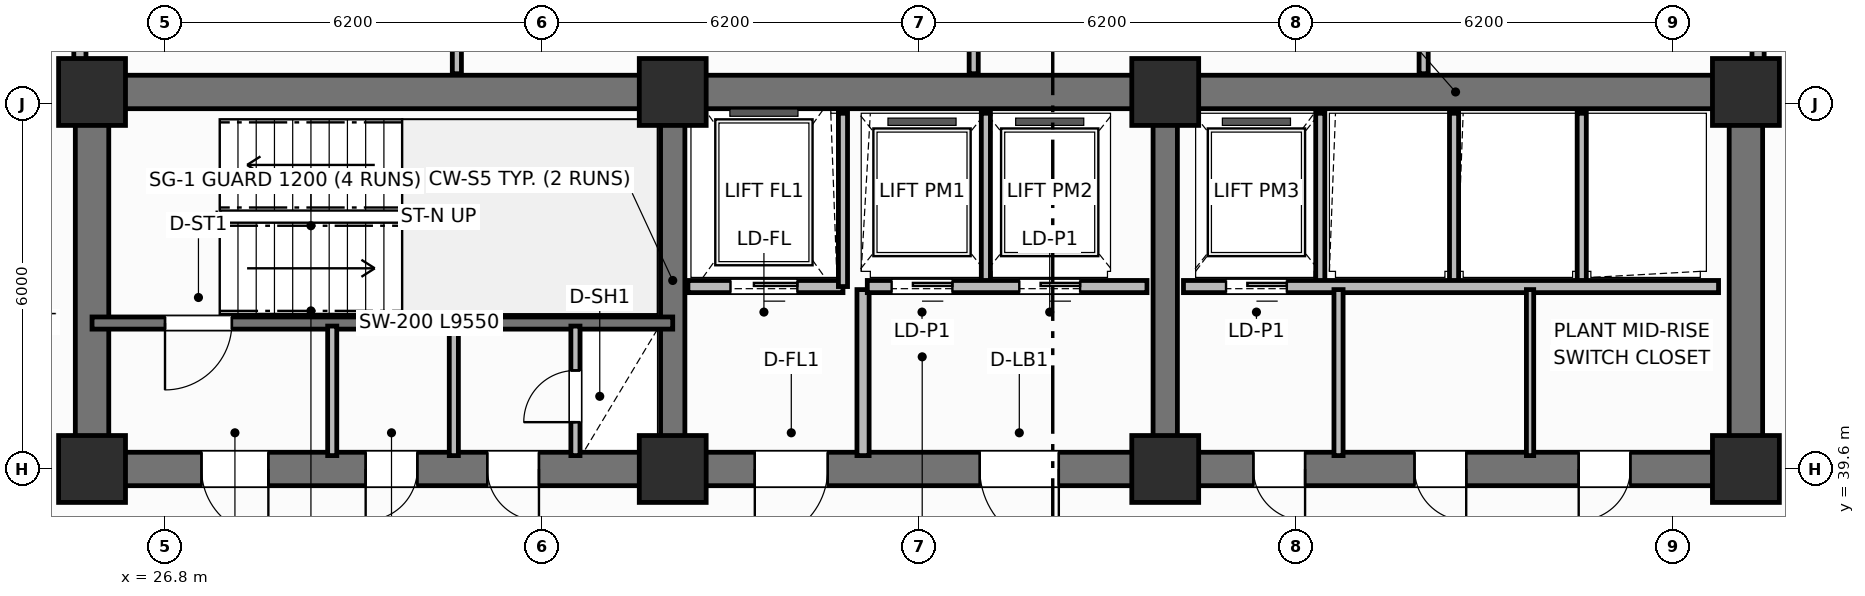
"""IFC4 building model, lengths in metres.
Left out: names, types, materials, properties, quantities, classifications, styles, units other than length and angle.
Written with IfcOpenShell. Run it as: python <this file> out.ifc"""

import sys

from ifc_helpers import new_model, si_unit, direction, frame, frame_2d, origin, origin_2d, place, context, subcontext, project, spatial, rectangle, extrude, element, fill, save


model = new_model("IFC4")
c1 = context("Model", 3, precision=1e-05, world=origin(), true_north=direction((0.0, 1.0)))
c2 = subcontext(c1, "Body", "Model", "MODEL_VIEW")
j1 = project(units=[si_unit("LENGTHUNIT", "METRE"), si_unit("PLANEANGLEUNIT", "RADIAN")], contexts=[c1])
p1 = place(None, origin())
s1 = spatial("IfcSite", under=j1, at=p1, CompositionType="ELEMENT")
p2 = place(p1, origin())
s2 = spatial("IfcBuilding", under=s1, at=p2, CompositionType="ELEMENT")
p3 = place(p2, frame((0.0, 0.0, 129.0)))
s3 = spatial("IfcBuildingStorey", under=s2, at=p3, CompositionType="ELEMENT", Elevation=129.0)
p4 = place(p3, frame((25.6, 45.8, 0.0), z_axis=(0.0, 0.0, 1.0), x_axis=(1.0, 0.0, 0.0)))
e1 = element("IfcWall", 1, at=p4, inside=s3, PredefinedType="SHEAR", context=c2, shape_type="SweptSolid", body=[
    extrude(rectangle(XDim=27.2, YDim=0.55, at=frame_2d((13.6, 0.0))), origin(), (0.0, 0.0, 1.0), 3.7),
])
for number, where, z_axis, x_axis in (
    (2, (25.6, 39.875, 0.0), (0.0, 0.0, 1.0), (0.0, 1.0, 0.0)),
    (3, (52.8, 39.875, 0.0), (0.0, 0.0, 1.0), (0.0, 1.0, 0.0)),
):
    element("IfcWall", number, at=place(p3, frame(where, z_axis=z_axis, x_axis=x_axis)), inside=s3, PredefinedType="SHEAR", context=c2, shape_type="SweptSolid", body=[
        extrude(rectangle(XDim=5.65, YDim=0.55, at=frame_2d((2.825, 0.0))), origin(), (0.0, 0.0, 1.0), 3.7),
    ])
p5 = place(p3, frame((52.8, 39.6, 0.0), z_axis=(0.0, 0.0, 1.0), x_axis=(-1.0, 0.0, 0.0)))
e4 = element("IfcWall", 4, at=p5, inside=s3, PredefinedType="SHEAR", context=c2, shape_type="SweptSolid", body=[
    extrude(rectangle(XDim=27.2, YDim=0.55, at=frame_2d((13.6, 0.0))), origin(), (0.0, 0.0, 1.0), 3.7),
])
p6 = place(p5, frame((24.3, 0.0, 0.0)))
e5 = element("IfcOpeningElement", 5, at=p6, cuts=e4, PredefinedType="OPENING", context=c2, shape_type="SweptSolid", body=[
    extrude(rectangle(XDim=1.1, YDim=2.15, at=frame_2d((0.55, 1.075))), frame((0.0, 0.285, 0.0), z_axis=(0.0, -1.0, 0.0), x_axis=(1.0, 0.0, 0.0)), (0.0, 0.0, 1.0), 0.57),
])
p7 = place(p5, frame((21.85, 0.0, 0.0)))
e6 = element("IfcOpeningElement", 6, at=p7, cuts=e4, PredefinedType="OPENING", context=c2, shape_type="SweptSolid", body=[
    extrude(rectangle(XDim=0.85, YDim=2.1, at=frame_2d((0.425, 1.05))), frame((0.0, 0.285, 0.0), z_axis=(0.0, -1.0, 0.0), x_axis=(1.0, 0.0, 0.0)), (0.0, 0.0, 1.0), 0.57),
])
p8 = place(p5, frame((19.85, 0.0, 0.0)))
e7 = element("IfcOpeningElement", 7, at=p8, cuts=e4, PredefinedType="OPENING", context=c2, shape_type="SweptSolid", body=[
    extrude(rectangle(XDim=0.85, YDim=2.1, at=frame_2d((0.425, 1.05))), frame((0.0, 0.285, 0.0), z_axis=(0.0, -1.0, 0.0), x_axis=(1.0, 0.0, 0.0)), (0.0, 0.0, 1.0), 0.57),
])
p9 = place(p5, frame((15.1, 0.0, 0.0)))
e8 = element("IfcOpeningElement", 8, at=p9, cuts=e4, PredefinedType="OPENING", context=c2, shape_type="SweptSolid", body=[
    extrude(rectangle(XDim=1.2, YDim=2.15, at=frame_2d((0.6, 1.075))), frame((0.0, 0.285, 0.0), z_axis=(0.0, -1.0, 0.0), x_axis=(1.0, 0.0, 0.0)), (0.0, 0.0, 1.0), 0.57),
])
p10 = place(p5, frame((11.3, 0.0, 0.0)))
e9 = element("IfcOpeningElement", 9, at=p10, cuts=e4, PredefinedType="OPENING", context=c2, shape_type="SweptSolid", body=[
    extrude(rectangle(XDim=1.3, YDim=2.2, at=frame_2d((0.65, 1.1))), frame((0.0, 0.285, 0.0), z_axis=(0.0, -1.0, 0.0), x_axis=(1.0, 0.0, 0.0)), (0.0, 0.0, 1.0), 0.57),
])
p11 = place(p5, frame((7.25, 0.0, 0.0)))
e10 = element("IfcOpeningElement", 10, at=p11, cuts=e4, PredefinedType="OPENING", context=c2, shape_type="SweptSolid", body=[
    extrude(rectangle(XDim=0.85, YDim=2.1, at=frame_2d((0.425, 1.05))), frame((0.0, 0.285, 0.0), z_axis=(0.0, -1.0, 0.0), x_axis=(1.0, 0.0, 0.0)), (0.0, 0.0, 1.0), 0.57),
])
p12 = place(p5, frame((4.6, 0.0, 0.0)))
e11 = element("IfcOpeningElement", 11, at=p12, cuts=e4, PredefinedType="OPENING", context=c2, shape_type="SweptSolid", body=[
    extrude(rectangle(XDim=0.85, YDim=2.1, at=frame_2d((0.425, 1.05))), frame((0.0, 0.285, 0.0), z_axis=(0.0, -1.0, 0.0), x_axis=(1.0, 0.0, 0.0)), (0.0, 0.0, 1.0), 0.57),
])
p13 = place(p5, frame((1.9, 0.0, 0.0)))
e12 = element("IfcOpeningElement", 12, at=p13, cuts=e4, PredefinedType="OPENING", context=c2, shape_type="SweptSolid", body=[
    extrude(rectangle(XDim=0.85, YDim=2.1, at=frame_2d((0.425, 1.05))), frame((0.0, 0.285, 0.0), z_axis=(0.0, -1.0, 0.0), x_axis=(1.0, 0.0, 0.0)), (0.0, 0.0, 1.0), 0.57),
])
for number, where, z_axis, x_axis in (
    (13, (35.15, 39.875, 0.0), (0.0, 0.0, 1.0), (0.0, 1.0, 0.0)),
    (14, (43.25, 39.875, 0.0), (0.0, 0.0, 1.0), (0.0, 1.0, 0.0)),
):
    element("IfcWall", number, at=place(p3, frame(where, z_axis=z_axis, x_axis=x_axis)), inside=s3, PredefinedType="SHEAR", context=c2, shape_type="SweptSolid", body=[
        extrude(rectangle(XDim=5.65, YDim=0.4, at=frame_2d((2.825, 0.0))), origin(), (0.0, 0.0, 1.0), 3.7),
    ])
for number, where, z_axis, x_axis in (
    (15, (25.6, 39.6, 0.0), (0.0, 0.0, 1.0), (1.0, 0.0, 0.0)),
    (16, (25.6, 45.8, 0.0), (0.0, 0.0, 1.0), (1.0, 0.0, 0.0)),
    (17, (35.15, 39.6, 0.0), (0.0, 0.0, 1.0), (1.0, 0.0, 0.0)),
    (18, (35.15, 45.8, 0.0), (0.0, 0.0, 1.0), (1.0, 0.0, 0.0)),
    (19, (43.25, 39.6, 0.0), (0.0, 0.0, 1.0), (1.0, 0.0, 0.0)),
    (20, (43.25, 45.8, 0.0), (0.0, 0.0, 1.0), (1.0, 0.0, 0.0)),
    (21, (52.8, 39.6, 0.0), (0.0, 0.0, 1.0), (1.0, 0.0, 0.0)),
    (22, (52.8, 45.8, 0.0), (0.0, 0.0, 1.0), (1.0, 0.0, 0.0)),
):
    element("IfcColumn", number, at=place(p3, frame(where, z_axis=z_axis, x_axis=x_axis)), inside=s3, PredefinedType="COLUMN", context=c2, shape_type="SweptSolid", body=[
        extrude(rectangle(XDim=1.1, YDim=1.1, at=origin_2d()), origin(), (0.0, 0.0, 1.0), 3.7),
    ])
p14 = place(p3, frame((35.15, 42.0, 0.0), z_axis=(0.0, 0.0, 1.0), x_axis=(-1.0, 0.0, 0.0)))
e23 = element("IfcWall", 23, at=p14, inside=s3, PredefinedType="SHEAR", context=c2, shape_type="SweptSolid", body=[
    extrude(rectangle(XDim=9.55, YDim=0.2, at=frame_2d((4.775, 0.0))), origin(), (0.0, 0.0, 1.0), 3.7),
])
p15 = place(p14, frame((7.25, 0.0, 0.0)))
e24 = element("IfcOpeningElement", 24, at=p15, cuts=e23, PredefinedType="OPENING", context=c2, shape_type="SweptSolid", body=[
    extrude(rectangle(XDim=1.1, YDim=2.15, at=frame_2d((0.55, 1.075))), frame((0.0, 0.11, 0.0), z_axis=(0.0, -1.0, 0.0), x_axis=(1.0, 0.0, 0.0)), (0.0, 0.0, 1.0), 0.22),
])
p16 = place(p3, frame((33.55, 39.82, 0.0), z_axis=(0.0, 0.0, 1.0), x_axis=(0.0, 1.0, 0.0)))
e25 = element("IfcWall", 25, at=p16, inside=s3, PredefinedType="PARTITIONING", context=c2, shape_type="SweptSolid", body=[
    extrude(rectangle(XDim=2.13, YDim=0.15, at=frame_2d((1.065, 0.0))), origin(), (0.0, 0.0, 1.0), 2.53),
])
p17 = place(p16, frame((0.55, 0.0, 0.0)))
e26 = element("IfcOpeningElement", 26, at=p17, cuts=e25, PredefinedType="OPENING", context=c2, shape_type="SweptSolid", body=[
    extrude(rectangle(XDim=0.85, YDim=2.05, at=frame_2d((0.425, 1.025))), frame((0.0, 0.085, 0.0), z_axis=(0.0, -1.0, 0.0), x_axis=(1.0, 0.0, 0.0)), (0.0, 0.0, 1.0), 0.17),
])
for number, where, z_axis, x_axis in (
    (27, (29.55, 39.82, 0.0), (0.0, 0.0, 1.0), (0.0, 1.0, 0.0)),
    (28, (31.55, 39.82, 0.0), (0.0, 0.0, 1.0), (0.0, 1.0, 0.0)),
):
    element("IfcWall", number, at=place(p3, frame(where, z_axis=z_axis, x_axis=x_axis)), inside=s3, PredefinedType="PARTITIONING", context=c2, shape_type="SweptSolid", body=[
        extrude(rectangle(XDim=2.13, YDim=0.15, at=frame_2d((1.065, 0.0))), origin(), (0.0, 0.0, 1.0), 2.53),
    ])
p18 = place(p3, frame((37.95, 42.6, 0.0), z_axis=(0.0, 0.0, 1.0), x_axis=(-1.0, 0.0, 0.0)))
e29 = element("IfcWall", 29, at=p18, inside=s3, PredefinedType="PARTITIONING", context=c2, shape_type="SweptSolid", body=[
    extrude(rectangle(XDim=2.55, YDim=0.2, at=frame_2d((1.275, 0.0))), origin(), (0.0, 0.0, 1.0), 2.3),
])
p19 = place(p18, frame((0.75, 0.0, 0.0)))
e30 = element("IfcOpeningElement", 30, at=p19, cuts=e29, PredefinedType="OPENING", context=c2, shape_type="SweptSolid", body=[
    extrude(rectangle(XDim=1.1, YDim=2.15, at=frame_2d((0.55, 1.075))), frame((0.0, 0.11, 0.0), z_axis=(0.0, -1.0, 0.0), x_axis=(1.0, 0.0, 0.0)), (0.0, 0.0, 1.0), 0.22),
])
p20 = place(p3, frame((37.95, 42.6, 0.0), z_axis=(0.0, 0.0, 1.0), x_axis=(0.0, 1.0, 0.0)))
e31 = element("IfcWall", 31, at=p20, inside=s3, PredefinedType="PARTITIONING", context=c2, shape_type="SweptSolid", body=[
    extrude(rectangle(XDim=2.85, YDim=0.15, at=frame_2d((1.425, 0.0))), origin(), (0.0, 0.0, 1.0), 2.53),
])
p21 = place(p3, frame((38.28, 39.82, 0.0), z_axis=(0.0, 0.0, 1.0), x_axis=(0.0, 1.0, 0.0)))
e32 = element("IfcWall", 32, at=p21, inside=s3, PredefinedType="PARTITIONING", context=c2, shape_type="SweptSolid", body=[
    extrude(rectangle(XDim=2.73, YDim=0.2, at=frame_2d((1.365, 0.0))), origin(), (0.0, 0.0, 1.0), 2.53),
])
p22 = place(p3, frame((40.3, 42.65, 0.0), z_axis=(0.0, 0.0, 1.0), x_axis=(0.0, 1.0, 0.0)))
e33 = element("IfcWall", 33, at=p22, inside=s3, PredefinedType="PARTITIONING", context=c2, shape_type="SweptSolid", body=[
    extrude(rectangle(XDim=2.8, YDim=0.15, at=frame_2d((1.4, 0.0))), origin(), (0.0, 0.0, 1.0), 2.53),
])
p23 = place(p3, frame((42.95, 42.6, 0.0), z_axis=(0.0, 0.0, 1.0), x_axis=(-1.0, 0.0, 0.0)))
e34 = element("IfcWall", 34, at=p23, inside=s3, PredefinedType="PARTITIONING", context=c2, shape_type="SweptSolid", body=[
    extrude(rectangle(XDim=4.6, YDim=0.2, at=frame_2d((2.3, 0.0))), origin(), (0.0, 0.0, 1.0), 2.3),
])
p24 = place(p23, frame((3.2, 0.0, 0.0)))
e35 = element("IfcOpeningElement", 35, at=p24, cuts=e34, PredefinedType="OPENING", context=c2, shape_type="SweptSolid", body=[
    extrude(rectangle(XDim=1.0, YDim=2.15, at=frame_2d((0.5, 1.075))), frame((0.0, 0.11, 0.0), z_axis=(0.0, -1.0, 0.0), x_axis=(1.0, 0.0, 0.0)), (0.0, 0.0, 1.0), 0.22),
])
p25 = place(p23, frame((1.1, 0.0, 0.0)))
e36 = element("IfcOpeningElement", 36, at=p25, cuts=e34, PredefinedType="OPENING", context=c2, shape_type="SweptSolid", body=[
    extrude(rectangle(XDim=1.0, YDim=2.15, at=frame_2d((0.5, 1.075))), frame((0.0, 0.11, 0.0), z_axis=(0.0, -1.0, 0.0), x_axis=(1.0, 0.0, 0.0)), (0.0, 0.0, 1.0), 0.22),
])
for number, where, z_axis, x_axis in (
    (37, (45.8, 42.65, 0.0), (0.0, 0.0, 1.0), (0.0, 1.0, 0.0)),
    (38, (48.0, 42.65, 0.0), (0.0, 0.0, 1.0), (0.0, 1.0, 0.0)),
    (39, (50.1, 42.65, 0.0), (0.0, 0.0, 1.0), (0.0, 1.0, 0.0)),
):
    element("IfcWall", number, at=place(p3, frame(where, z_axis=z_axis, x_axis=x_axis)), inside=s3, PredefinedType="PARTITIONING", context=c2, shape_type="SweptSolid", body=[
        extrude(rectangle(XDim=2.8, YDim=0.15, at=frame_2d((1.4, 0.0))), origin(), (0.0, 0.0, 1.0), 2.53),
    ])
p26 = place(p3, frame((52.35, 42.6, 0.0), z_axis=(0.0, 0.0, 1.0), x_axis=(-1.0, 0.0, 0.0)))
e40 = element("IfcWall", 40, at=p26, inside=s3, PredefinedType="PARTITIONING", context=c2, shape_type="SweptSolid", body=[
    extrude(rectangle(XDim=8.8, YDim=0.2, at=frame_2d((4.4, 0.0))), origin(), (0.0, 0.0, 1.0), 2.53),
])
p27 = place(p26, frame((7.1, 0.0, 0.0)))
e41 = element("IfcOpeningElement", 41, at=p27, cuts=e40, PredefinedType="OPENING", context=c2, shape_type="SweptSolid", body=[
    extrude(rectangle(XDim=1.0, YDim=2.15, at=frame_2d((0.5, 1.075))), frame((0.0, 0.11, 0.0), z_axis=(0.0, -1.0, 0.0), x_axis=(1.0, 0.0, 0.0)), (0.0, 0.0, 1.0), 0.22),
])
p28 = place(p3, frame((46.1, 39.82, 0.0), z_axis=(0.0, 0.0, 1.0), x_axis=(0.0, 1.0, 0.0)))
e42 = element("IfcWall", 42, at=p28, inside=s3, PredefinedType="PARTITIONING", context=c2, shape_type="SweptSolid", body=[
    extrude(rectangle(XDim=2.73, YDim=0.15, at=frame_2d((1.365, 0.0))), origin(), (0.0, 0.0, 1.0), 2.53),
])
p29 = place(p3, frame((49.25, 39.82, 0.0), z_axis=(0.0, 0.0, 1.0), x_axis=(0.0, 1.0, 0.0)))
e43 = element("IfcWall", 43, at=p29, inside=s3, PredefinedType="PARTITIONING", context=c2, shape_type="SweptSolid", body=[
    extrude(rectangle(XDim=2.73, YDim=0.12, at=frame_2d((1.365, 0.0))), origin(), (0.0, 0.0, 1.0), 2.53),
])
p30 = place(p3, frame((31.6, 46.1, 0.0), z_axis=(0.0, 0.0, 1.0), x_axis=(0.0, 1.0, 0.0)))
e44 = element("IfcWall", 44, at=p30, inside=s3, PredefinedType="PARTITIONING", context=c2, shape_type="SweptSolid", body=[
    extrude(rectangle(XDim=5.33, YDim=0.15, at=frame_2d((2.665, 0.0))), origin(), (0.0, 0.0, 1.0), 2.53),
])
p31 = place(p30, frame((0.85, 0.0, 0.0)))
e45 = element("IfcOpeningElement", 45, at=p31, cuts=e44, PredefinedType="OPENING", context=c2, shape_type="SweptSolid", body=[
    extrude(rectangle(XDim=0.9, YDim=2.1, at=frame_2d((0.45, 1.05))), frame((0.0, 0.085, 0.0), z_axis=(0.0, -1.0, 0.0), x_axis=(1.0, 0.0, 0.0)), (0.0, 0.0, 1.0), 0.17),
])
p32 = place(p3, frame((40.1, 46.1, 0.0), z_axis=(0.0, 0.0, 1.0), x_axis=(0.0, 1.0, 0.0)))
e46 = element("IfcWall", 46, at=p32, inside=s3, PredefinedType="PARTITIONING", context=c2, shape_type="SweptSolid", body=[
    extrude(rectangle(XDim=5.33, YDim=0.15, at=frame_2d((2.665, 0.0))), origin(), (0.0, 0.0, 1.0), 2.53),
])
p33 = place(p3, frame((47.5, 46.1, 0.0), z_axis=(0.0, 0.0, 1.0), x_axis=(0.0, 1.0, 0.0)))
e47 = element("IfcWall", 47, at=p33, inside=s3, PredefinedType="PARTITIONING", context=c2, shape_type="SweptSolid", body=[
    extrude(rectangle(XDim=5.33, YDim=0.15, at=frame_2d((2.665, 0.0))), origin(), (0.0, 0.0, 1.0), 2.53),
])
p34 = place(p33, frame((0.85, 0.0, 0.0)))
e48 = element("IfcOpeningElement", 48, at=p34, cuts=e47, PredefinedType="OPENING", context=c2, shape_type="SweptSolid", body=[
    extrude(rectangle(XDim=0.9, YDim=2.1, at=frame_2d((0.45, 1.05))), frame((0.0, 0.085, 0.0), z_axis=(0.0, -1.0, 0.0), x_axis=(1.0, 0.0, 0.0)), (0.0, 0.0, 1.0), 0.17),
])
p35 = place(p3, frame((25.4, 46.1, 0.0), z_axis=(0.0, 0.0, 1.0), x_axis=(0.0, 1.0, 0.0)))
e49 = element("IfcWall", 49, at=p35, inside=s3, PredefinedType="PARTITIONING", context=c2, shape_type="SweptSolid", body=[
    extrude(rectangle(XDim=4.13, YDim=0.2, at=frame_2d((2.065, 0.0))), origin(), (0.0, 0.0, 1.0), 2.53),
])
p36 = place(p35, frame((1.05, 0.0, 0.0)))
e50 = element("IfcOpeningElement", 50, at=p36, cuts=e49, PredefinedType="OPENING", context=c2, shape_type="SweptSolid", body=[
    extrude(rectangle(XDim=0.9, YDim=2.1, at=frame_2d((0.45, 1.05))), frame((0.0, 0.11, 0.0), z_axis=(0.0, -1.0, 0.0), x_axis=(1.0, 0.0, 0.0)), (0.0, 0.0, 1.0), 0.22),
])
p37 = place(p3, frame((53.0, 46.1, 0.0), z_axis=(0.0, 0.0, 1.0), x_axis=(0.0, 1.0, 0.0)))
e51 = element("IfcWall", 51, at=p37, inside=s3, PredefinedType="PARTITIONING", context=c2, shape_type="SweptSolid", body=[
    extrude(rectangle(XDim=4.13, YDim=0.2, at=frame_2d((2.065, 0.0))), origin(), (0.0, 0.0, 1.0), 2.53),
])
p38 = place(p37, frame((1.05, 0.0, 0.0)))
e52 = element("IfcOpeningElement", 52, at=p38, cuts=e51, PredefinedType="OPENING", context=c2, shape_type="SweptSolid", body=[
    extrude(rectangle(XDim=0.9, YDim=2.1, at=frame_2d((0.45, 1.05))), frame((0.0, 0.11, 0.0), z_axis=(0.0, -1.0, 0.0), x_axis=(1.0, 0.0, 0.0)), (0.0, 0.0, 1.0), 0.22),
])
p39 = place(p15, origin())
e53 = element("IfcDoor", 53, at=p39, inside=s3, OperationType="SINGLE_SWING_RIGHT", PredefinedType="DOOR", context=c2, shape_type="SweptSolid", body=[
    extrude(rectangle(XDim=1.1, YDim=2.15, at=frame_2d((0.55, 1.075))), frame((0.0, 0.025, 0.0), z_axis=(0.0, -1.0, 0.0), x_axis=(1.0, 0.0, 0.0)), (0.0, 0.0, 1.0), 0.05),
])
fill(e24, e53)
p40 = place(p17, origin())
e54 = element("IfcDoor", 54, at=p40, inside=s3, OperationType="SINGLE_SWING_LEFT", PredefinedType="TRAPDOOR", context=c2, shape_type="SweptSolid", body=[
    extrude(rectangle(XDim=0.85, YDim=2.05, at=frame_2d((0.425, 1.025))), frame((0.0, 0.025, 0.0), z_axis=(0.0, -1.0, 0.0), x_axis=(1.0, 0.0, 0.0)), (0.0, 0.0, 1.0), 0.05),
])
fill(e26, e54)
p41 = place(p19, origin())
e55 = element("IfcDoor", 55, at=p41, inside=s3, OperationType="SLIDING_TO_LEFT", PredefinedType="DOOR", context=c2, shape_type="SweptSolid", body=[
    extrude(rectangle(XDim=1.1, YDim=2.15, at=frame_2d((0.55, 1.075))), frame((0.0, 0.025, 0.0), z_axis=(0.0, -1.0, 0.0), x_axis=(1.0, 0.0, 0.0)), (0.0, 0.0, 1.0), 0.05),
])
fill(e30, e55)
p42 = place(p24, origin())
e56 = element("IfcDoor", 56, at=p42, inside=s3, OperationType="SLIDING_TO_LEFT", PredefinedType="DOOR", context=c2, shape_type="SweptSolid", body=[
    extrude(rectangle(XDim=1.0, YDim=2.15, at=frame_2d((0.5, 1.075))), frame((0.0, 0.025, 0.0), z_axis=(0.0, -1.0, 0.0), x_axis=(1.0, 0.0, 0.0)), (0.0, 0.0, 1.0), 0.05),
])
fill(e35, e56)
p43 = place(p25, origin())
e57 = element("IfcDoor", 57, at=p43, inside=s3, OperationType="SLIDING_TO_LEFT", PredefinedType="DOOR", context=c2, shape_type="SweptSolid", body=[
    extrude(rectangle(XDim=1.0, YDim=2.15, at=frame_2d((0.5, 1.075))), frame((0.0, 0.025, 0.0), z_axis=(0.0, -1.0, 0.0), x_axis=(1.0, 0.0, 0.0)), (0.0, 0.0, 1.0), 0.05),
])
fill(e36, e57)
p44 = place(p27, origin())
e58 = element("IfcDoor", 58, at=p44, inside=s3, OperationType="SLIDING_TO_LEFT", PredefinedType="DOOR", context=c2, shape_type="SweptSolid", body=[
    extrude(rectangle(XDim=1.0, YDim=2.15, at=frame_2d((0.5, 1.075))), frame((0.0, 0.025, 0.0), z_axis=(0.0, -1.0, 0.0), x_axis=(1.0, 0.0, 0.0)), (0.0, 0.0, 1.0), 0.05),
])
fill(e41, e58)
p45 = place(p6, origin())
e59 = element("IfcDoor", 59, at=p45, inside=s3, OperationType="SINGLE_SWING_LEFT", PredefinedType="DOOR", context=c2, shape_type="SweptSolid", body=[
    extrude(rectangle(XDim=1.1, YDim=2.15, at=frame_2d((0.55, 1.075))), frame((0.0, 0.025, 0.0), z_axis=(0.0, -1.0, 0.0), x_axis=(1.0, 0.0, 0.0)), (0.0, 0.0, 1.0), 0.05),
])
fill(e5, e59)
p46 = place(p7, origin())
e60 = element("IfcDoor", 60, at=p46, inside=s3, OperationType="SINGLE_SWING_RIGHT", PredefinedType="DOOR", context=c2, shape_type="SweptSolid", body=[
    extrude(rectangle(XDim=0.85, YDim=2.1, at=frame_2d((0.425, 1.05))), frame((0.0, 0.025, 0.0), z_axis=(0.0, -1.0, 0.0), x_axis=(1.0, 0.0, 0.0)), (0.0, 0.0, 1.0), 0.05),
])
fill(e6, e60)
p47 = place(p8, origin())
e61 = element("IfcDoor", 61, at=p47, inside=s3, OperationType="SINGLE_SWING_LEFT", PredefinedType="DOOR", context=c2, shape_type="SweptSolid", body=[
    extrude(rectangle(XDim=0.85, YDim=2.1, at=frame_2d((0.425, 1.05))), frame((0.0, 0.025, 0.0), z_axis=(0.0, -1.0, 0.0), x_axis=(1.0, 0.0, 0.0)), (0.0, 0.0, 1.0), 0.05),
])
fill(e7, e61)
p48 = place(p9, origin())
e62 = element("IfcDoor", 62, at=p48, inside=s3, OperationType="SINGLE_SWING_RIGHT", PredefinedType="DOOR", context=c2, shape_type="SweptSolid", body=[
    extrude(rectangle(XDim=1.2, YDim=2.15, at=frame_2d((0.6, 1.075))), frame((0.0, 0.025, 0.0), z_axis=(0.0, -1.0, 0.0), x_axis=(1.0, 0.0, 0.0)), (0.0, 0.0, 1.0), 0.05),
])
fill(e8, e62)
p49 = place(p10, origin())
e63 = element("IfcDoor", 63, at=p49, inside=s3, OperationType="SINGLE_SWING_LEFT", PredefinedType="DOOR", context=c2, shape_type="SweptSolid", body=[
    extrude(rectangle(XDim=1.3, YDim=2.2, at=frame_2d((0.65, 1.1))), frame((0.0, 0.025, 0.0), z_axis=(0.0, -1.0, 0.0), x_axis=(1.0, 0.0, 0.0)), (0.0, 0.0, 1.0), 0.05),
])
fill(e9, e63)
p50 = place(p11, origin())
e64 = element("IfcDoor", 64, at=p50, inside=s3, OperationType="SINGLE_SWING_LEFT", PredefinedType="DOOR", context=c2, shape_type="SweptSolid", body=[
    extrude(rectangle(XDim=0.85, YDim=2.1, at=frame_2d((0.425, 1.05))), frame((0.0, 0.025, 0.0), z_axis=(0.0, -1.0, 0.0), x_axis=(1.0, 0.0, 0.0)), (0.0, 0.0, 1.0), 0.05),
])
fill(e10, e64)
p51 = place(p12, origin())
e65 = element("IfcDoor", 65, at=p51, inside=s3, OperationType="SINGLE_SWING_LEFT", PredefinedType="DOOR", context=c2, shape_type="SweptSolid", body=[
    extrude(rectangle(XDim=0.85, YDim=2.1, at=frame_2d((0.425, 1.05))), frame((0.0, 0.025, 0.0), z_axis=(0.0, -1.0, 0.0), x_axis=(1.0, 0.0, 0.0)), (0.0, 0.0, 1.0), 0.05),
])
fill(e11, e65)
p52 = place(p13, origin())
e66 = element("IfcDoor", 66, at=p52, inside=s3, OperationType="SINGLE_SWING_RIGHT", PredefinedType="DOOR", context=c2, shape_type="SweptSolid", body=[
    extrude(rectangle(XDim=0.85, YDim=2.1, at=frame_2d((0.425, 1.05))), frame((0.0, 0.025, 0.0), z_axis=(0.0, -1.0, 0.0), x_axis=(1.0, 0.0, 0.0)), (0.0, 0.0, 1.0), 0.05),
])
fill(e12, e66)
save(model, sys.argv[1])
